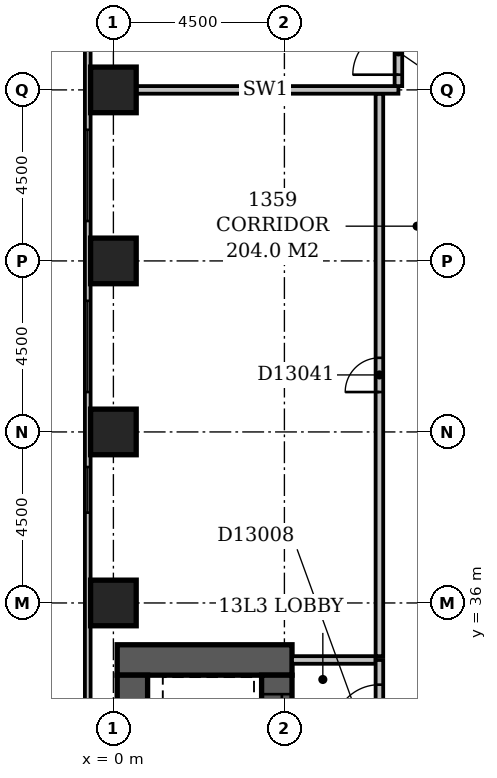
"""IFC4 building model, lengths in metres.
Left out: names, types, materials, properties, quantities, classifications, styles, units other than length and angle.
Written with IfcOpenShell. Run it as: python <this file> out.ifc"""

import sys

from ifc_helpers import new_model, si_unit, direction, frame, frame_2d, origin, origin_2d, place, context, subcontext, project, spatial, rectangle, extrude, element, fill, save


model = new_model("IFC4")
c1 = context("Model", 3, precision=1e-05, world=origin(), true_north=direction((0.0, 1.0)))
c2 = subcontext(c1, "Body", "Model", "MODEL_VIEW")
j1 = project(units=[si_unit("LENGTHUNIT", "METRE"), si_unit("PLANEANGLEUNIT", "RADIAN")], contexts=[c1])
p1 = place(None, origin())
s1 = spatial("IfcSite", under=j1, at=p1, CompositionType="ELEMENT")
p2 = place(p1, origin())
s2 = spatial("IfcBuilding", under=s1, at=p2, CompositionType="ELEMENT")
p3 = place(p2, frame((0.0, 0.0, 57.8)))
s3 = spatial("IfcBuildingStorey", under=s2, at=p3, CompositionType="ELEMENT", Elevation=57.8)
p4 = place(p3, frame((0.1, 34.5, -0.3), z_axis=(0.0, 0.0, 1.0), x_axis=(1.0, 0.0, 0.0)))
e1 = element("IfcWall", 1, at=p4, inside=s3, PredefinedType="SHEAR", context=c2, shape_type="SweptSolid", body=[
    extrude(rectangle(XDim=4.6, YDim=0.8, at=frame_2d((2.3, 0.0))), origin(), (0.0, 0.0, 1.0), 3.6),
])
p5 = place(p3, frame((0.5, 27.15, -0.3), z_axis=(0.0, 0.0, 1.0), x_axis=(0.0, 1.0, 0.0)))
e2 = element("IfcWall", 2, at=p5, inside=s3, PredefinedType="SHEAR", context=c2, shape_type="SweptSolid", body=[
    extrude(rectangle(XDim=6.95, YDim=0.8, at=frame_2d((3.475, 0.0))), origin(), (0.0, 0.0, 1.0), 3.6),
])
p6 = place(p3, frame((4.3, 27.15, -0.3), z_axis=(0.0, 0.0, 1.0), x_axis=(0.0, 1.0, 0.0)))
e3 = element("IfcWall", 3, at=p6, inside=s3, PredefinedType="SHEAR", context=c2, shape_type="SweptSolid", body=[
    extrude(rectangle(XDim=6.95, YDim=0.8, at=frame_2d((3.475, 0.0))), origin(), (0.0, 0.0, 1.0), 3.6),
])
p7 = place(p6, frame((3.05, 0.0, 0.3)))
e4 = element("IfcOpeningElement", 4, at=p7, cuts=e3, PredefinedType="OPENING", context=c2, shape_type="SweptSolid", body=[
    extrude(rectangle(XDim=1.1, YDim=2.1, at=frame_2d((0.55, 1.05))), frame((0.0, 0.412, 0.0), z_axis=(0.0, -1.0, 0.0), x_axis=(1.0, 0.0, 0.0)), (0.0, 0.0, 1.0), 0.824),
])
p8 = place(p6, frame((0.55, 0.0, 0.3)))
e5 = element("IfcOpeningElement", 5, at=p8, cuts=e3, PredefinedType="OPENING", context=c2, shape_type="SweptSolid", body=[
    extrude(rectangle(XDim=1.1, YDim=2.1, at=frame_2d((0.55, 1.05))), frame((0.0, 0.412, 0.0), z_axis=(0.0, -1.0, 0.0), x_axis=(1.0, 0.0, 0.0)), (0.0, 0.0, 1.0), 0.824),
])
p9 = place(p6, frame((5.35, 0.0, 0.3)))
e6 = element("IfcOpeningElement", 6, at=p9, cuts=e3, PredefinedType="OPENING", context=c2, shape_type="SweptSolid", body=[
    extrude(rectangle(XDim=1.1, YDim=2.1, at=frame_2d((0.55, 1.05))), frame((0.0, 0.412, 0.0), z_axis=(0.0, -1.0, 0.0), x_axis=(1.0, 0.0, 0.0)), (0.0, 0.0, 1.0), 0.824),
])
for number, where, z_axis, x_axis in (
    (7, (0.0, 36.0, -0.3), (0.0, 0.0, 1.0), (1.0, 0.0, 0.0)),
    (8, (0.0, 40.5, -0.3), (0.0, 0.0, 1.0), (1.0, 0.0, 0.0)),
    (9, (0.0, 45.0, -0.3), (0.0, 0.0, 1.0), (1.0, 0.0, 0.0)),
    (10, (0.0, 49.5, -0.3), (0.0, 0.0, 1.0), (1.0, 0.0, 0.0)),
):
    element("IfcColumn", number, at=place(p3, frame(where, z_axis=z_axis, x_axis=x_axis)), inside=s3, PredefinedType="COLUMN", context=c2, shape_type="SweptSolid", body=[
        extrude(rectangle(XDim=1.2, YDim=1.2, at=origin_2d()), origin(), (0.0, 0.0, 1.0), 3.6),
    ])
p10 = place(p3, frame((-0.675, 59.1, 0.0), z_axis=(0.0, 0.0, 1.0), x_axis=(0.0, -1.0, 0.0)))
e11 = element("IfcWall", 11, at=p10, inside=s3, PredefinedType="STANDARD", context=c2, shape_type="SweptSolid", body=[
    extrude(rectangle(XDim=55.35, YDim=0.15, at=frame_2d((27.675, 0.0))), origin(), (0.0, 0.0, 1.0), 2.7),
])
p11 = place(p10, frame((10.65, 0.0, 0.6)))
e12 = element("IfcOpeningElement", 12, at=p11, cuts=e11, PredefinedType="OPENING", context=c2, shape_type="SweptSolid", body=[
    extrude(rectangle(XDim=2.4, YDim=1.8, at=frame_2d((1.2, 0.9))), frame((0.0, 0.087, 0.0), z_axis=(0.0, -1.0, 0.0), x_axis=(1.0, 0.0, 0.0)), (0.0, 0.0, 1.0), 0.174),
])
p12 = place(p10, frame((15.15, 0.0, 0.6)))
e13 = element("IfcOpeningElement", 13, at=p12, cuts=e11, PredefinedType="OPENING", context=c2, shape_type="SweptSolid", body=[
    extrude(rectangle(XDim=2.4, YDim=1.8, at=frame_2d((1.2, 0.9))), frame((0.0, 0.087, 0.0), z_axis=(0.0, -1.0, 0.0), x_axis=(1.0, 0.0, 0.0)), (0.0, 0.0, 1.0), 0.174),
])
p13 = place(p10, frame((19.523, 0.0, 0.6)))
e14 = element("IfcOpeningElement", 14, at=p13, cuts=e11, PredefinedType="OPENING", context=c2, shape_type="SweptSolid", body=[
    extrude(rectangle(XDim=1.2, YDim=1.8, at=frame_2d((0.6, 0.9))), frame((0.0, 0.087, 0.0), z_axis=(0.0, -1.0, 0.0), x_axis=(1.0, 0.0, 0.0)), (0.0, 0.0, 1.0), 0.174),
])
p14 = place(p3, frame((7.0, 32.1, 0.0), z_axis=(0.0, 0.0, 1.0), x_axis=(0.0, 1.0, 0.0)))
e15 = element("IfcWall", 15, at=p14, inside=s3, PredefinedType="PARTITIONING", context=c2, shape_type="SweptSolid", body=[
    extrude(rectangle(XDim=2.4, YDim=0.2, at=frame_2d((1.2, 0.0))), origin(), (0.0, 0.0, 1.0), 3.3),
])
p15 = place(p14, frame((0.55, 0.0, 0.0)))
e16 = element("IfcOpeningElement", 16, at=p15, cuts=e15, PredefinedType="OPENING", context=c2, shape_type="SweptSolid", body=[
    extrude(rectangle(XDim=1.2, YDim=2.1, at=frame_2d((0.6, 1.05))), frame((0.0, 0.112, 0.0), z_axis=(0.0, -1.0, 0.0), x_axis=(1.0, 0.0, 0.0)), (0.0, 0.0, 1.0), 0.224),
])
p16 = place(p3, frame((4.7, 34.5, 0.0), z_axis=(0.0, 0.0, 1.0), x_axis=(1.0, 0.0, 0.0)))
e17 = element("IfcWall", 17, at=p16, inside=s3, PredefinedType="PARTITIONING", context=c2, shape_type="SweptSolid", body=[
    extrude(rectangle(XDim=2.2, YDim=0.2, at=frame_2d((1.1, 0.0))), origin(), (0.0, 0.0, 1.0), 3.3),
])
p17 = place(p3, frame((0.5, 49.5, 0.0), z_axis=(0.0, 0.0, 1.0), x_axis=(1.0, 0.0, 0.0)))
e18 = element("IfcWall", 18, at=p17, inside=s3, PredefinedType="PARTITIONING", context=c2, shape_type="SweptSolid", body=[
    extrude(rectangle(XDim=7.0, YDim=0.2, at=frame_2d((3.5, 0.0))), origin(), (0.0, 0.0, 1.0), 3.3),
])
p18 = place(p3, frame((7.5, 49.6, 0.0), z_axis=(0.0, 0.0, 1.0), x_axis=(0.0, 1.0, 0.0)))
e19 = element("IfcWall", 19, at=p18, inside=s3, PredefinedType="PARTITIONING", context=c2, shape_type="SweptSolid", body=[
    extrude(rectangle(XDim=3.9, YDim=0.2, at=frame_2d((1.95, 0.0))), origin(), (0.0, 0.0, 1.0), 3.3),
])
p19 = place(p18, frame((0.3, 0.0, 0.0)))
e20 = element("IfcOpeningElement", 20, at=p19, cuts=e19, PredefinedType="OPENING", context=c2, shape_type="SweptSolid", body=[
    extrude(rectangle(XDim=1.2, YDim=2.1, at=frame_2d((0.6, 1.05))), frame((0.0, 0.112, 0.0), z_axis=(0.0, -1.0, 0.0), x_axis=(1.0, 0.0, 0.0)), (0.0, 0.0, 1.0), 0.224),
])
p20 = place(p3, frame((7.0, 34.6, 0.0), z_axis=(0.0, 0.0, 1.0), x_axis=(0.0, 1.0, 0.0)))
e21 = element("IfcWall", 21, at=p20, inside=s3, PredefinedType="PARTITIONING", context=c2, shape_type="SweptSolid", body=[
    extrude(rectangle(XDim=14.8, YDim=0.2, at=frame_2d((7.4, 0.0))), origin(), (0.0, 0.0, 1.0), 3.3),
])
p21 = place(p20, frame((6.95, 0.0, 0.0)))
e22 = element("IfcOpeningElement", 22, at=p21, cuts=e21, PredefinedType="OPENING", context=c2, shape_type="SweptSolid", body=[
    extrude(rectangle(XDim=0.9, YDim=2.1, at=frame_2d((0.45, 1.05))), frame((0.0, 0.112, 0.0), z_axis=(0.0, -1.0, 0.0), x_axis=(1.0, 0.0, 0.0)), (0.0, 0.0, 1.0), 0.224),
])
p22 = place(p11, origin())
e23 = element("IfcWindow", 23, at=p22, inside=s3, PartitioningType="SINGLE_PANEL", PredefinedType="WINDOW", context=c2, shape_type="SweptSolid", body=[
    extrude(rectangle(XDim=2.4, YDim=1.8, at=frame_2d((1.2, 0.9))), frame((0.0, 0.03, 0.0), z_axis=(0.0, -1.0, 0.0), x_axis=(1.0, 0.0, 0.0)), (0.0, 0.0, 1.0), 0.06),
])
fill(e12, e23)
p23 = place(p12, origin())
e24 = element("IfcWindow", 24, at=p23, inside=s3, PartitioningType="SINGLE_PANEL", PredefinedType="WINDOW", context=c2, shape_type="SweptSolid", body=[
    extrude(rectangle(XDim=2.4, YDim=1.8, at=frame_2d((1.2, 0.9))), frame((0.0, 0.03, 0.0), z_axis=(0.0, -1.0, 0.0), x_axis=(1.0, 0.0, 0.0)), (0.0, 0.0, 1.0), 0.06),
])
fill(e13, e24)
p24 = place(p13, origin())
e25 = element("IfcWindow", 25, at=p24, inside=s3, PartitioningType="SINGLE_PANEL", PredefinedType="WINDOW", context=c2, shape_type="SweptSolid", body=[
    extrude(rectangle(XDim=1.2, YDim=1.8, at=frame_2d((0.6, 0.9))), frame((0.0, 0.03, 0.0), z_axis=(0.0, -1.0, 0.0), x_axis=(1.0, 0.0, 0.0)), (0.0, 0.0, 1.0), 0.06),
])
fill(e14, e25)
p25 = place(p19, origin())
e26 = element("IfcDoor", 26, at=p25, inside=s3, OperationType="SINGLE_SWING_LEFT", PredefinedType="DOOR", context=c2, shape_type="SweptSolid", body=[
    extrude(rectangle(XDim=1.2, YDim=2.1, at=frame_2d((0.6, 1.05))), frame((0.0, 0.025, 0.0), z_axis=(0.0, -1.0, 0.0), x_axis=(1.0, 0.0, 0.0)), (0.0, 0.0, 1.0), 0.05),
])
fill(e20, e26)
p26 = place(p15, origin())
e27 = element("IfcDoor", 27, at=p26, inside=s3, OperationType="SINGLE_SWING_LEFT", PredefinedType="DOOR", context=c2, shape_type="SweptSolid", body=[
    extrude(rectangle(XDim=1.2, YDim=2.1, at=frame_2d((0.6, 1.05))), frame((0.0, 0.025, 0.0), z_axis=(0.0, -1.0, 0.0), x_axis=(1.0, 0.0, 0.0)), (0.0, 0.0, 1.0), 0.05),
])
fill(e16, e27)
p27 = place(p9, origin())
e28 = element("IfcDoor", 28, at=p27, inside=s3, OperationType="SLIDING_TO_LEFT", PredefinedType="DOOR", context=c2, shape_type="SweptSolid", body=[
    extrude(rectangle(XDim=1.1, YDim=2.1, at=frame_2d((0.55, 1.05))), frame((0.0, 0.025, 0.0), z_axis=(0.0, -1.0, 0.0), x_axis=(1.0, 0.0, 0.0)), (0.0, 0.0, 1.0), 0.05),
])
fill(e6, e28)
p28 = place(p21, origin())
e29 = element("IfcDoor", 29, at=p28, inside=s3, OperationType="SINGLE_SWING_LEFT", PredefinedType="DOOR", context=c2, shape_type="SweptSolid", body=[
    extrude(rectangle(XDim=0.9, YDim=2.1, at=frame_2d((0.45, 1.05))), frame((0.0, 0.025, 0.0), z_axis=(0.0, -1.0, 0.0), x_axis=(1.0, 0.0, 0.0)), (0.0, 0.0, 1.0), 0.05),
])
fill(e22, e29)
save(model, sys.argv[1])
